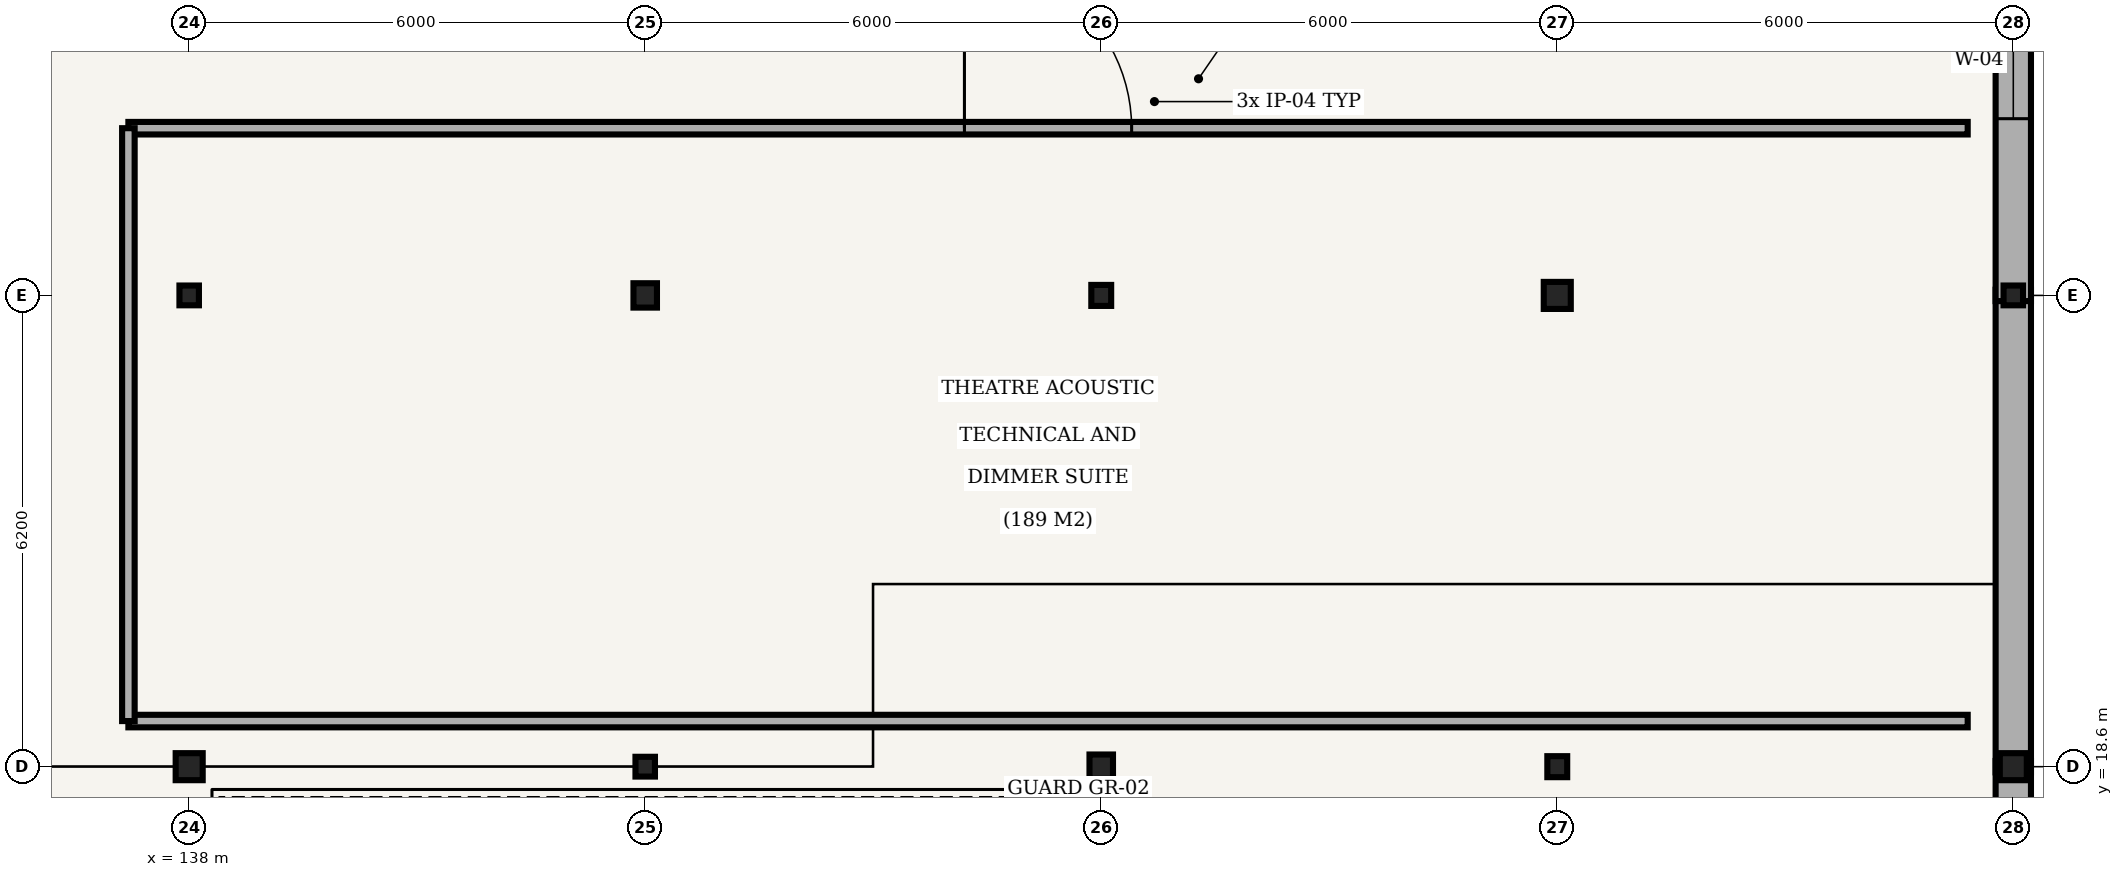
"""IFC4 building model, lengths in metres.
Left out: names, types, materials, properties, quantities, classifications, styles, units other than length and angle.
Written with IfcOpenShell. Run it as: python <this file> out.ifc"""

import sys

from ifc_helpers import new_model, si_unit, direction, frame, frame_2d, origin, origin_2d, place, context, subcontext, project, spatial, rectangle, hollow_circle, i_section, extrude, element, fill, save


model = new_model("IFC4")
c1 = context("Model", 3, precision=1e-05, world=origin(), true_north=direction((0.0, 1.0)))
c2 = subcontext(c1, "Body", "Model", "MODEL_VIEW")
j1 = project(units=[si_unit("LENGTHUNIT", "METRE"), si_unit("PLANEANGLEUNIT", "RADIAN")], contexts=[c1])
p1 = place(None, origin())
s1 = spatial("IfcSite", under=j1, at=p1, CompositionType="ELEMENT")
p2 = place(p1, origin())
s2 = spatial("IfcBuilding", under=s1, at=p2, CompositionType="ELEMENT")
p3 = place(p2, frame((0.0, 0.0, 10.8)))
s3 = spatial("IfcBuildingStorey", under=s2, at=p3, CompositionType="ELEMENT", Elevation=10.8)
p4 = place(p3, frame((138.0, 18.6, 0.0), z_axis=(0.0, 0.0, 1.0), x_axis=(1.0, 0.0, 0.0)))
e1 = element("IfcColumn", 1, at=p4, inside=s3, PredefinedType="COLUMN", context=c2, shape_type="SweptSolid", body=[
    extrude(hollow_circle(Radius=0.178, WallThickness=0.012, at=origin_2d()), origin(), (0.0, 0.0, 1.0), 4.53),
])
for number, where, z_axis, x_axis in (
    (2, (138.0, 24.8, 0.0), (0.0, 0.0, 1.0), (1.0, 0.0, 0.0)),
    (3, (144.0, 18.6, 0.0), (0.0, 0.0, 1.0), (1.0, 0.0, 0.0)),
):
    element("IfcColumn", number, at=place(p3, frame(where, z_axis=z_axis, x_axis=x_axis)), inside=s3, PredefinedType="COLUMN", context=c2, shape_type="SweptSolid", body=[
        extrude(i_section(OverallWidth=0.256, OverallDepth=0.26, WebThickness=0.01, FlangeThickness=0.017, FilletRadius=0.013, at=origin_2d()), origin(), (0.0, 0.0, 1.0), 4.53),
    ])
for number, where, z_axis, x_axis in (
    (4, (144.0, 24.8, 0.0), (0.0, 0.0, 1.0), (1.0, 0.0, 0.0)),
    (5, (150.0, 18.6, 0.0), (0.0, 0.0, 1.0), (1.0, 0.0, 0.0)),
):
    element("IfcColumn", number, at=place(p3, frame(where, z_axis=z_axis, x_axis=x_axis)), inside=s3, PredefinedType="COLUMN", context=c2, shape_type="SweptSolid", body=[
        extrude(i_section(OverallWidth=0.309, OverallDepth=0.321, WebThickness=0.014, FlangeThickness=0.022, FilletRadius=0.015, at=origin_2d()), origin(), (0.0, 0.0, 1.0), 4.53),
    ])
for number, where, z_axis, x_axis in (
    (6, (150.0, 24.8, 0.0), (0.0, 0.0, 1.0), (1.0, 0.0, 0.0)),
    (7, (156.0, 18.6, 0.0), (0.0, 0.0, 1.0), (1.0, 0.0, 0.0)),
):
    element("IfcColumn", number, at=place(p3, frame(where, z_axis=z_axis, x_axis=x_axis)), inside=s3, PredefinedType="COLUMN", context=c2, shape_type="SweptSolid", body=[
        extrude(i_section(OverallWidth=0.261, OverallDepth=0.276, WebThickness=0.015, FlangeThickness=0.025, FilletRadius=0.013, at=origin_2d()), origin(), (0.0, 0.0, 1.0), 4.53),
    ])
for number, where, z_axis, x_axis in (
    (8, (156.0, 24.8, 0.0), (0.0, 0.0, 1.0), (1.0, 0.0, 0.0)),
    (9, (162.0, 18.6, 0.0), (0.0, 0.0, 1.0), (1.0, 0.0, 0.0)),
):
    element("IfcColumn", number, at=place(p3, frame(where, z_axis=z_axis, x_axis=x_axis)), inside=s3, PredefinedType="COLUMN", context=c2, shape_type="SweptSolid", body=[
        extrude(hollow_circle(Radius=0.178, WallThickness=0.012, at=origin_2d()), origin(), (0.0, 0.0, 1.0), 4.53),
    ])
p5 = place(p3, frame((162.0, 24.8, 0.0), z_axis=(0.0, 0.0, 1.0), x_axis=(1.0, 0.0, 0.0)))
e10 = element("IfcColumn", 10, at=p5, inside=s3, PredefinedType="COLUMN", context=c2, shape_type="SweptSolid", body=[
    extrude(i_section(OverallWidth=0.256, OverallDepth=0.26, WebThickness=0.01, FlangeThickness=0.017, FilletRadius=0.013, at=origin_2d()), origin(), (0.0, 0.0, 1.0), 4.53),
])
for number, where, z_axis, x_axis in (
    (11, (162.0, 12.325, 0.0), (0.0, 0.0, 1.0), (0.0, 1.0, 0.0)),
    (12, (162.0, 18.525, 0.0), (0.0, 0.0, 1.0), (0.0, 1.0, 0.0)),
):
    element("IfcWall", number, at=place(p3, frame(where, z_axis=z_axis, x_axis=x_axis)), inside=s3, PredefinedType="SOLIDWALL", context=c2, shape_type="SweptSolid", body=[
        extrude(rectangle(XDim=6.35, YDim=0.465, at=frame_2d((3.175, 0.0))), origin(), (0.0, 0.0, 1.0), 3.58),
    ])
p6 = place(p3, frame((162.0, 24.725, 0.0), z_axis=(0.0, 0.0, 1.0), x_axis=(0.0, 1.0, 0.0)))
e13 = element("IfcWall", 13, at=p6, inside=s3, PredefinedType="SOLIDWALL", context=c2, shape_type="SweptSolid", body=[
    extrude(rectangle(XDim=6.35, YDim=0.465, at=frame_2d((3.175, 0.0))), origin(), (0.0, 0.0, 1.0), 3.58),
])
p7 = place(p6, frame((2.4, 0.0, 0.9)))
e14 = element("IfcOpeningElement", 14, at=p7, cuts=e13, PredefinedType="OPENING", context=c2, shape_type="SweptSolid", body=[
    extrude(rectangle(XDim=1.55, YDim=1.3, at=frame_2d((0.775, 0.65))), frame((0.0, 0.242, 0.0), z_axis=(0.0, -1.0, 0.0), x_axis=(1.0, 0.0, 0.0)), (0.0, 0.0, 1.0), 0.485),
])
p8 = place(p3, frame((137.2, 27.0, 0.0), z_axis=(0.0, 0.0, 1.0), x_axis=(1.0, 0.0, 0.0)))
e15 = element("IfcWall", 15, at=p8, inside=s3, PredefinedType="PARTITIONING", context=c2, shape_type="SweptSolid", body=[
    extrude(rectangle(XDim=24.2, YDim=0.165, at=frame_2d((12.1, 0.0))), origin(), (0.0, 0.0, 1.0), 3.52),
])
p9 = place(p8, frame((11.0, 0.0, 0.0)))
e16 = element("IfcOpeningElement", 16, at=p9, cuts=e15, PredefinedType="OPENING", context=c2, shape_type="SweptSolid", body=[
    extrude(rectangle(XDim=2.2, YDim=2.1, at=frame_2d((1.1, 1.05))), frame((0.0, 0.093, 0.0), z_axis=(0.0, -1.0, 0.0), x_axis=(1.0, 0.0, 0.0)), (0.0, 0.0, 1.0), 0.185),
])
p10 = place(p3, frame((161.4, 19.2, 0.0), z_axis=(0.0, 0.0, 1.0), x_axis=(-1.0, 0.0, 0.0)))
e17 = element("IfcWall", 17, at=p10, inside=s3, PredefinedType="PARTITIONING", context=c2, shape_type="SweptSolid", body=[
    extrude(rectangle(XDim=24.2, YDim=0.165, at=frame_2d((12.1, 0.0))), origin(), (0.0, 0.0, 1.0), 3.52),
])
p11 = place(p3, frame((137.2, 19.2, 0.0), z_axis=(0.0, 0.0, 1.0), x_axis=(0.0, 1.0, 0.0)))
e18 = element("IfcWall", 18, at=p11, inside=s3, PredefinedType="PARTITIONING", context=c2, shape_type="SweptSolid", body=[
    extrude(rectangle(XDim=7.8, YDim=0.165, at=frame_2d((3.9, 0.0))), origin(), (0.0, 0.0, 1.0), 3.52),
])
p12 = place(p7, origin())
e19 = element("IfcWindow", 19, at=p12, inside=s3, PartitioningType="SINGLE_PANEL", PredefinedType="WINDOW", context=c2, shape_type="SweptSolid", body=[
    extrude(rectangle(XDim=1.55, YDim=1.3, at=frame_2d((0.775, 0.65))), frame((0.0, 0.03, 0.0), z_axis=(0.0, -1.0, 0.0), x_axis=(1.0, 0.0, 0.0)), (0.0, 0.0, 1.0), 0.06),
])
fill(e14, e19)
p13 = place(p9, origin())
e20 = element("IfcDoor", 20, at=p13, inside=s3, OperationType="DOUBLE_DOOR_SINGLE_SWING", PredefinedType="DOOR", context=c2, shape_type="SweptSolid", body=[
    extrude(rectangle(XDim=2.2, YDim=2.1, at=frame_2d((1.1, 1.05))), frame((0.0, 0.025, 0.0), z_axis=(0.0, -1.0, 0.0), x_axis=(1.0, 0.0, 0.0)), (0.0, 0.0, 1.0), 0.05),
])
fill(e16, e20)
save(model, sys.argv[1])
